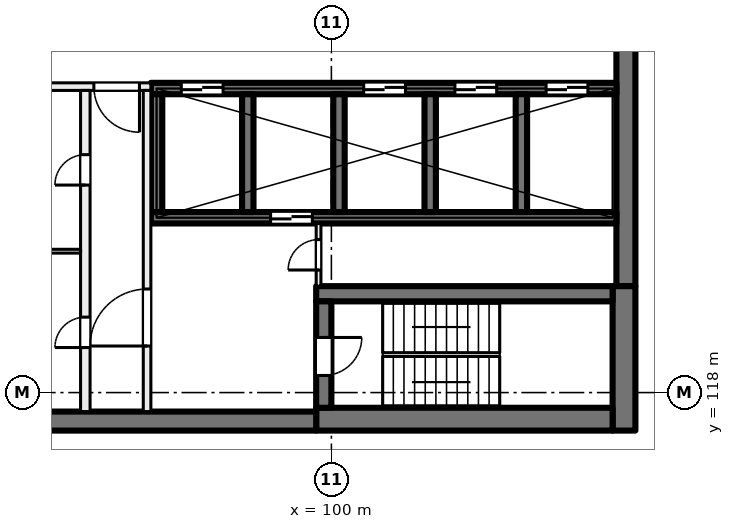
"""IFC4 building model, lengths in metres.
Left out: names, types, materials, properties, quantities, classifications, styles, units other than length and angle.
Written with IfcOpenShell. Run it as: python <this file> out.ifc"""

import sys

from ifc_helpers import new_model, si_unit, direction, frame, frame_2d, origin, place, context, subcontext, project, spatial, rectangle, extrude, element, fill, save


model = new_model("IFC4")
c1 = context("Model", 3, precision=1e-05, world=origin(), true_north=direction((0.0, 1.0)))
c2 = subcontext(c1, "Body", "Model", "MODEL_VIEW")
j1 = project(units=[si_unit("LENGTHUNIT", "METRE"), si_unit("PLANEANGLEUNIT", "RADIAN")], contexts=[c1])
p1 = place(None, origin())
s1 = spatial("IfcSite", under=j1, at=p1, CompositionType="ELEMENT")
p2 = place(p1, origin())
s2 = spatial("IfcBuilding", under=s1, at=p2, CompositionType="ELEMENT")
p3 = place(p2, frame((0.0, 0.0, 188.0)))
s3 = spatial("IfcBuildingStorey", under=s2, at=p3, CompositionType="ELEMENT", Elevation=188.0)
p4 = place(p3, frame((107.75, 135.2, 0.0), z_axis=(0.0, 0.0, 1.0), x_axis=(0.0, -1.0, 0.0)))
e1 = element("IfcWall", 1, at=p4, inside=s3, PredefinedType="SHEAR", context=c2, shape_type="SweptSolid", body=[
    extrude(rectangle(XDim=14.4, YDim=0.5, at=frame_2d((7.2, 0.0))), origin(), (0.0, 0.0, 1.0), 4.0),
])
p5 = place(p3, frame((107.7, 120.8, 0.0), z_axis=(0.0, 0.0, 1.0), x_axis=(0.0, -1.0, 0.0)))
e2 = element("IfcWall", 2, at=p5, inside=s3, PredefinedType="SHEAR", context=c2, shape_type="SweptSolid", body=[
    extrude(rectangle(XDim=3.8, YDim=0.6, at=frame_2d((1.9, 0.0))), origin(), (0.0, 0.0, 1.0), 4.0),
])
p6 = place(p3, frame((107.4, 117.3, 0.0), z_axis=(0.0, 0.0, 1.0), x_axis=(-1.0, 0.0, 0.0)))
e3 = element("IfcWall", 3, at=p6, inside=s3, PredefinedType="SHEAR", context=c2, shape_type="SweptSolid", body=[
    extrude(rectangle(XDim=7.8, YDim=0.6, at=frame_2d((3.9, 0.0))), origin(), (0.0, 0.0, 1.0), 4.0),
])
p7 = place(p3, frame((99.6, 117.25, 0.0), z_axis=(0.0, 0.0, 1.0), x_axis=(-1.0, 0.0, 0.0)))
e4 = element("IfcWall", 4, at=p7, inside=s3, PredefinedType="SHEAR", context=c2, shape_type="SweptSolid", body=[
    extrude(rectangle(XDim=8.975, YDim=0.5, at=frame_2d((4.488, 0.0))), origin(), (0.0, 0.0, 1.0), 4.0),
])
p8 = place(p3, frame((107.4, 120.6, 0.0), z_axis=(0.0, 0.0, 1.0), x_axis=(-1.0, 0.0, 0.0)))
e5 = element("IfcWall", 5, at=p8, inside=s3, PredefinedType="SHEAR", context=c2, shape_type="SweptSolid", body=[
    extrude(rectangle(XDim=7.8, YDim=0.4, at=frame_2d((3.9, 0.0))), origin(), (0.0, 0.0, 1.0), 4.0),
])
p9 = place(p3, frame((99.8, 120.4, 0.0), z_axis=(0.0, 0.0, 1.0), x_axis=(0.0, -1.0, 0.0)))
e6 = element("IfcWall", 6, at=p9, inside=s3, PredefinedType="SHEAR", context=c2, shape_type="SweptSolid", body=[
    extrude(rectangle(XDim=2.8, YDim=0.4, at=frame_2d((1.4, 0.0))), origin(), (0.0, 0.0, 1.0), 4.0),
])
p10 = place(p9, frame((0.95, 0.0, 0.0)))
e7 = element("IfcOpeningElement", 7, at=p10, cuts=e6, PredefinedType="OPENING", context=c2, shape_type="SweptSolid", body=[
    extrude(rectangle(XDim=1.0, YDim=2.1, at=frame_2d((0.5, 1.05))), frame((0.0, 0.21, 0.0), z_axis=(0.0, -1.0, 0.0), x_axis=(1.0, 0.0, 0.0)), (0.0, 0.0, 1.0), 0.42),
])
p11 = place(p3, frame((107.5, 126.0, 0.0), z_axis=(0.0, 0.0, 1.0), x_axis=(-1.0, 0.0, 0.0)))
e8 = element("IfcWall", 8, at=p11, inside=s3, PredefinedType="SHEAR", context=c2, shape_type="SweptSolid", body=[
    extrude(rectangle(XDim=12.25, YDim=0.3, at=frame_2d((6.125, 0.0))), origin(), (0.0, 0.0, 1.0), 4.0),
])
p12 = place(p11, frame((0.75, 0.0, 0.0)))
e9 = element("IfcOpeningElement", 9, at=p12, cuts=e8, PredefinedType="OPENING", context=c2, shape_type="SweptSolid", body=[
    extrude(rectangle(XDim=1.1, YDim=2.1, at=frame_2d((0.55, 1.05))), frame((0.0, 0.16, 0.0), z_axis=(0.0, -1.0, 0.0), x_axis=(1.0, 0.0, 0.0)), (0.0, 0.0, 1.0), 0.32),
])
p13 = place(p11, frame((3.15, 0.0, 0.0)))
e10 = element("IfcOpeningElement", 10, at=p13, cuts=e8, PredefinedType="OPENING", context=c2, shape_type="SweptSolid", body=[
    extrude(rectangle(XDim=1.1, YDim=2.1, at=frame_2d((0.55, 1.05))), frame((0.0, 0.16, 0.0), z_axis=(0.0, -1.0, 0.0), x_axis=(1.0, 0.0, 0.0)), (0.0, 0.0, 1.0), 0.32),
])
p14 = place(p11, frame((5.55, 0.0, 0.0)))
e11 = element("IfcOpeningElement", 11, at=p14, cuts=e8, PredefinedType="OPENING", context=c2, shape_type="SweptSolid", body=[
    extrude(rectangle(XDim=1.1, YDim=2.1, at=frame_2d((0.55, 1.05))), frame((0.0, 0.16, 0.0), z_axis=(0.0, -1.0, 0.0), x_axis=(1.0, 0.0, 0.0)), (0.0, 0.0, 1.0), 0.32),
])
p15 = place(p11, frame((10.35, 0.0, 0.0)))
e12 = element("IfcOpeningElement", 12, at=p15, cuts=e8, PredefinedType="OPENING", context=c2, shape_type="SweptSolid", body=[
    extrude(rectangle(XDim=1.1, YDim=2.1, at=frame_2d((0.55, 1.05))), frame((0.0, 0.16, 0.0), z_axis=(0.0, -1.0, 0.0), x_axis=(1.0, 0.0, 0.0)), (0.0, 0.0, 1.0), 0.32),
])
p16 = place(p3, frame((107.5, 122.6, 0.0), z_axis=(0.0, 0.0, 1.0), x_axis=(-1.0, 0.0, 0.0)))
e13 = element("IfcWall", 13, at=p16, inside=s3, PredefinedType="SHEAR", context=c2, shape_type="SweptSolid", body=[
    extrude(rectangle(XDim=12.25, YDim=0.3, at=frame_2d((6.125, 0.0))), origin(), (0.0, 0.0, 1.0), 4.0),
])
p17 = place(p16, frame((8.0, 0.0, 0.0)))
e14 = element("IfcOpeningElement", 14, at=p17, cuts=e13, PredefinedType="OPENING", context=c2, shape_type="SweptSolid", body=[
    extrude(rectangle(XDim=1.1, YDim=2.1, at=frame_2d((0.55, 1.05))), frame((0.0, 0.16, 0.0), z_axis=(0.0, -1.0, 0.0), x_axis=(1.0, 0.0, 0.0)), (0.0, 0.0, 1.0), 0.32),
])
for number, where, z_axis, x_axis in (
    (15, (105.0, 125.85, 0.0), (0.0, 0.0, 1.0), (0.0, -1.0, 0.0)),
    (16, (102.6, 125.85, 0.0), (0.0, 0.0, 1.0), (0.0, -1.0, 0.0)),
    (17, (100.2, 125.85, 0.0), (0.0, 0.0, 1.0), (0.0, -1.0, 0.0)),
    (18, (97.8, 125.85, 0.0), (0.0, 0.0, 1.0), (0.0, -1.0, 0.0)),
    (19, (95.4, 125.85, 0.0), (0.0, 0.0, 1.0), (0.0, -1.0, 0.0)),
):
    element("IfcWall", number, at=place(p3, frame(where, z_axis=z_axis, x_axis=x_axis)), inside=s3, PredefinedType="SHEAR", context=c2, shape_type="SweptSolid", body=[
        extrude(rectangle(XDim=3.1, YDim=0.3, at=frame_2d((1.55, 0.0))), origin(), (0.0, 0.0, 1.0), 4.0),
    ])
p18 = place(p3, frame((95.25, 126.05, 0.0), z_axis=(0.0, 0.0, 1.0), x_axis=(-1.0, 0.0, 0.0)))
e20 = element("IfcWall", 20, at=p18, inside=s3, PredefinedType="PARTITIONING", context=c2, shape_type="SweptSolid", body=[
    extrude(rectangle(XDim=3.95, YDim=0.2, at=frame_2d((1.975, 0.0))), origin(), (0.0, 0.0, 1.0), 3.625),
])
p19 = place(p18, frame((0.3, 0.0, 0.0)))
e21 = element("IfcOpeningElement", 21, at=p19, cuts=e20, PredefinedType="OPENING", context=c2, shape_type="SweptSolid", body=[
    extrude(rectangle(XDim=1.2, YDim=2.1, at=frame_2d((0.6, 1.05))), frame((0.0, 0.11, 0.0), z_axis=(0.0, -1.0, 0.0), x_axis=(1.0, 0.0, 0.0)), (0.0, 0.0, 1.0), 0.22),
])
p20 = place(p3, frame((95.15, 117.5, 0.0), z_axis=(0.0, 0.0, 1.0), x_axis=(0.0, 1.0, 0.0)))
e22 = element("IfcWall", 22, at=p20, inside=s3, PredefinedType="PARTITIONING", context=c2, shape_type="SweptSolid", body=[
    extrude(rectangle(XDim=8.45, YDim=0.2, at=frame_2d((4.225, 0.0))), origin(), (0.0, 0.0, 1.0), 3.625),
])
p21 = place(p20, frame((1.725, 0.0, 0.0)))
e23 = element("IfcOpeningElement", 23, at=p21, cuts=e22, PredefinedType="OPENING", context=c2, shape_type="SweptSolid", body=[
    extrude(rectangle(XDim=1.5, YDim=2.1, at=frame_2d((0.75, 1.05))), frame((0.0, 0.11, 0.0), z_axis=(0.0, -1.0, 0.0), x_axis=(1.0, 0.0, 0.0)), (0.0, 0.0, 1.0), 0.22),
])
p22 = place(p3, frame((93.525, 117.5, 0.0), z_axis=(0.0, 0.0, 1.0), x_axis=(0.0, 1.0, 0.0)))
e24 = element("IfcWall", 24, at=p22, inside=s3, PredefinedType="PARTITIONING", context=c2, shape_type="SweptSolid", body=[
    extrude(rectangle(XDim=8.45, YDim=0.25, at=frame_2d((4.225, 0.0))), origin(), (0.0, 0.0, 1.0), 3.625),
])
p23 = place(p22, frame((5.96, 0.0, 0.0)))
e25 = element("IfcOpeningElement", 25, at=p23, cuts=e24, PredefinedType="OPENING", context=c2, shape_type="SweptSolid", body=[
    extrude(rectangle(XDim=0.8, YDim=2.1, at=frame_2d((0.4, 1.05))), frame((0.0, 0.135, 0.0), z_axis=(0.0, -1.0, 0.0), x_axis=(1.0, 0.0, 0.0)), (0.0, 0.0, 1.0), 0.27),
])
p24 = place(p22, frame((1.685, 0.0, 0.0)))
e26 = element("IfcOpeningElement", 26, at=p24, cuts=e24, PredefinedType="OPENING", context=c2, shape_type="SweptSolid", body=[
    extrude(rectangle(XDim=0.8, YDim=2.1, at=frame_2d((0.4, 1.05))), frame((0.0, 0.135, 0.0), z_axis=(0.0, -1.0, 0.0), x_axis=(1.0, 0.0, 0.0)), (0.0, 0.0, 1.0), 0.27),
])
p25 = place(p3, frame((99.663, 120.8, 0.0), z_axis=(0.0, 0.0, 1.0), x_axis=(0.0, 1.0, 0.0)))
e27 = element("IfcWall", 27, at=p25, inside=s3, PredefinedType="PARTITIONING", context=c2, shape_type="SweptSolid", body=[
    extrude(rectangle(XDim=1.65, YDim=0.125, at=frame_2d((0.825, 0.0))), origin(), (0.0, 0.0, 1.0), 3.625),
])
p26 = place(p25, frame((0.425, 0.0, 0.0)))
e28 = element("IfcOpeningElement", 28, at=p26, cuts=e27, PredefinedType="OPENING", context=c2, shape_type="SweptSolid", body=[
    extrude(rectangle(XDim=0.8, YDim=2.1, at=frame_2d((0.4, 1.05))), frame((0.0, 0.073, 0.0), z_axis=(0.0, -1.0, 0.0), x_axis=(1.0, 0.0, 0.0)), (0.0, 0.0, 1.0), 0.145),
])
p27 = place(p3, frame((93.4, 121.72, 0.0), z_axis=(0.0, 0.0, 1.0), x_axis=(-1.0, 0.0, 0.0)))
e29 = element("IfcWall", 29, at=p27, inside=s3, PredefinedType="PARTITIONING", context=c2, shape_type="SweptSolid", body=[
    extrude(rectangle(XDim=2.1, YDim=0.1, at=frame_2d((1.05, 0.0))), origin(), (0.0, 0.0, 1.0), 3.625),
])
p28 = place(p12, origin())
e30 = element("IfcDoor", 30, at=p28, inside=s3, OperationType="DOUBLE_DOOR_SLIDING", PredefinedType="DOOR", context=c2, shape_type="SweptSolid", body=[
    extrude(rectangle(XDim=1.1, YDim=2.1, at=frame_2d((0.55, 1.05))), frame((0.0, 0.025, 0.0), z_axis=(0.0, -1.0, 0.0), x_axis=(1.0, 0.0, 0.0)), (0.0, 0.0, 1.0), 0.05),
])
fill(e9, e30)
p29 = place(p13, origin())
e31 = element("IfcDoor", 31, at=p29, inside=s3, OperationType="DOUBLE_DOOR_SLIDING", PredefinedType="DOOR", context=c2, shape_type="SweptSolid", body=[
    extrude(rectangle(XDim=1.1, YDim=2.1, at=frame_2d((0.55, 1.05))), frame((0.0, 0.025, 0.0), z_axis=(0.0, -1.0, 0.0), x_axis=(1.0, 0.0, 0.0)), (0.0, 0.0, 1.0), 0.05),
])
fill(e10, e31)
p30 = place(p14, origin())
e32 = element("IfcDoor", 32, at=p30, inside=s3, OperationType="DOUBLE_DOOR_SLIDING", PredefinedType="DOOR", context=c2, shape_type="SweptSolid", body=[
    extrude(rectangle(XDim=1.1, YDim=2.1, at=frame_2d((0.55, 1.05))), frame((0.0, 0.025, 0.0), z_axis=(0.0, -1.0, 0.0), x_axis=(1.0, 0.0, 0.0)), (0.0, 0.0, 1.0), 0.05),
])
fill(e11, e32)
p31 = place(p15, origin())
e33 = element("IfcDoor", 33, at=p31, inside=s3, OperationType="DOUBLE_DOOR_SLIDING", PredefinedType="DOOR", context=c2, shape_type="SweptSolid", body=[
    extrude(rectangle(XDim=1.1, YDim=2.1, at=frame_2d((0.55, 1.05))), frame((0.0, 0.025, 0.0), z_axis=(0.0, -1.0, 0.0), x_axis=(1.0, 0.0, 0.0)), (0.0, 0.0, 1.0), 0.05),
])
fill(e12, e33)
p32 = place(p19, origin())
e34 = element("IfcDoor", 34, at=p32, inside=s3, OperationType="DOUBLE_DOOR_SINGLE_SWING", PredefinedType="DOOR", context=c2, shape_type="SweptSolid", body=[
    extrude(rectangle(XDim=1.2, YDim=2.1, at=frame_2d((0.6, 1.05))), frame((0.0, 0.025, 0.0), z_axis=(0.0, -1.0, 0.0), x_axis=(1.0, 0.0, 0.0)), (0.0, 0.0, 1.0), 0.05),
])
fill(e21, e34)
p33 = place(p21, origin())
e35 = element("IfcDoor", 35, at=p33, inside=s3, OperationType="DOUBLE_DOOR_SINGLE_SWING", PredefinedType="DOOR", context=c2, shape_type="SweptSolid", body=[
    extrude(rectangle(XDim=1.5, YDim=2.1, at=frame_2d((0.75, 1.05))), frame((0.0, 0.025, 0.0), z_axis=(0.0, -1.0, 0.0), x_axis=(1.0, 0.0, 0.0)), (0.0, 0.0, 1.0), 0.05),
])
fill(e23, e35)
p34 = place(p10, origin())
e36 = element("IfcDoor", 36, at=p34, inside=s3, OperationType="SINGLE_SWING_LEFT", PredefinedType="DOOR", context=c2, shape_type="SweptSolid", body=[
    extrude(rectangle(XDim=1.0, YDim=2.1, at=frame_2d((0.5, 1.05))), frame((0.0, 0.025, 0.0), z_axis=(0.0, -1.0, 0.0), x_axis=(1.0, 0.0, 0.0)), (0.0, 0.0, 1.0), 0.05),
])
fill(e7, e36)
p35 = place(p26, origin())
e37 = element("IfcDoor", 37, at=p35, inside=s3, OperationType="SINGLE_SWING_RIGHT", PredefinedType="DOOR", context=c2, shape_type="SweptSolid", body=[
    extrude(rectangle(XDim=0.8, YDim=2.1, at=frame_2d((0.4, 1.05))), frame((0.0, 0.025, 0.0), z_axis=(0.0, -1.0, 0.0), x_axis=(1.0, 0.0, 0.0)), (0.0, 0.0, 1.0), 0.05),
])
fill(e28, e37)
p36 = place(p23, origin())
e38 = element("IfcDoor", 38, at=p36, inside=s3, OperationType="SINGLE_SWING_LEFT", PredefinedType="DOOR", context=c2, shape_type="SweptSolid", body=[
    extrude(rectangle(XDim=0.8, YDim=2.1, at=frame_2d((0.4, 1.05))), frame((0.0, 0.025, 0.0), z_axis=(0.0, -1.0, 0.0), x_axis=(1.0, 0.0, 0.0)), (0.0, 0.0, 1.0), 0.05),
])
fill(e25, e38)
p37 = place(p24, origin())
e39 = element("IfcDoor", 39, at=p37, inside=s3, OperationType="SINGLE_SWING_RIGHT", PredefinedType="DOOR", context=c2, shape_type="SweptSolid", body=[
    extrude(rectangle(XDim=0.8, YDim=2.1, at=frame_2d((0.4, 1.05))), frame((0.0, 0.025, 0.0), z_axis=(0.0, -1.0, 0.0), x_axis=(1.0, 0.0, 0.0)), (0.0, 0.0, 1.0), 0.05),
])
fill(e26, e39)
p38 = place(p17, origin())
e40 = element("IfcDoor", 40, at=p38, inside=s3, OperationType="DOUBLE_DOOR_SLIDING", PredefinedType="DOOR", context=c2, shape_type="SweptSolid", body=[
    extrude(rectangle(XDim=1.1, YDim=2.1, at=frame_2d((0.55, 1.05))), frame((0.0, 0.025, 0.0), z_axis=(0.0, -1.0, 0.0), x_axis=(1.0, 0.0, 0.0)), (0.0, 0.0, 1.0), 0.05),
])
fill(e14, e40)
save(model, sys.argv[1])
